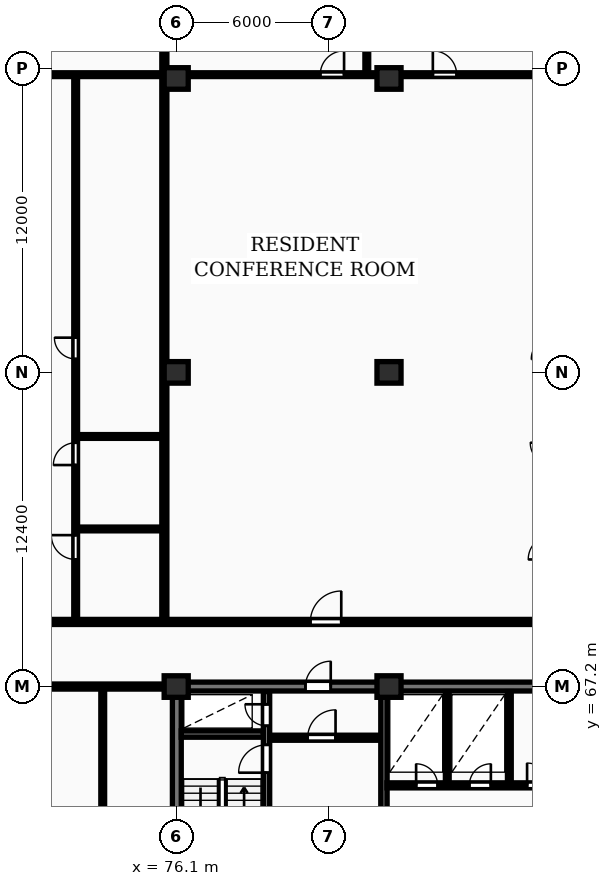
"""IFC4 building model, lengths in metres.
Left out: names, types, materials, properties, quantities, classifications, styles, units other than length and angle.
Written with IfcOpenShell. Run it as: python <this file> out.ifc"""

import sys

from ifc_helpers import new_model, si_unit, direction, frame, frame_2d, origin, origin_2d, place, context, subcontext, project, spatial, rectangle, extrude, element, fill, save


model = new_model("IFC4")
c1 = context("Model", 3, precision=1e-05, world=origin(), true_north=direction((0.0, 1.0)))
c2 = subcontext(c1, "Body", "Model", "MODEL_VIEW")
j1 = project(units=[si_unit("LENGTHUNIT", "METRE"), si_unit("PLANEANGLEUNIT", "RADIAN")], contexts=[c1])
p1 = place(None, origin())
s1 = spatial("IfcSite", under=j1, at=p1, CompositionType="ELEMENT")
p2 = place(p1, origin())
s2 = spatial("IfcBuilding", under=s1, at=p2, CompositionType="ELEMENT")
p3 = place(p2, frame((0.0, 0.0, 100.3)))
s3 = spatial("IfcBuildingStorey", under=s2, at=p3, CompositionType="ELEMENT", Elevation=100.3)
for number, where, z_axis, x_axis in (
    (1, (76.1, 67.2, 0.0), (0.0, 0.0, 1.0), (1.0, 0.0, 0.0)),
    (2, (76.1, 79.6, 0.0), (0.0, 0.0, 1.0), (1.0, 0.0, 0.0)),
    (3, (76.1, 91.2, 0.0), (0.0, 0.0, 1.0), (1.0, 0.0, 0.0)),
    (4, (84.5, 67.2, 0.0), (0.0, 0.0, 1.0), (1.0, 0.0, 0.0)),
    (5, (84.5, 79.6, 0.0), (0.0, 0.0, 1.0), (1.0, 0.0, 0.0)),
    (6, (84.5, 91.2, 0.0), (0.0, 0.0, 1.0), (1.0, 0.0, 0.0)),
):
    element("IfcColumn", number, at=place(p3, frame(where, z_axis=z_axis, x_axis=x_axis)), inside=s3, PredefinedType="COLUMN", context=c2, shape_type="SweptSolid", body=[
        extrude(rectangle(XDim=0.95, YDim=0.85, at=origin_2d()), origin(), (0.0, 0.0, 1.0), 3.25),
    ])
p4 = place(p3, frame((76.125, 55.375, 0.0), z_axis=(0.0, 0.0, 1.0), x_axis=(0.0, 1.0, 0.0)))
e7 = element("IfcWall", 7, at=p4, inside=s3, PredefinedType="SHEAR", context=c2, shape_type="SweptSolid", body=[
    extrude(rectangle(XDim=11.65, YDim=0.35, at=frame_2d((5.825, 0.0))), origin(), (0.0, 0.0, 1.0), 3.25),
])
p5 = place(p3, frame((75.95, 67.2, 0.0), z_axis=(0.0, 0.0, 1.0), x_axis=(1.0, 0.0, 0.0)))
e8 = element("IfcWall", 8, at=p5, inside=s3, PredefinedType="SHEAR", context=c2, shape_type="SweptSolid", body=[
    extrude(rectangle(XDim=36.3, YDim=0.35, at=frame_2d((18.15, 0.0))), origin(), (0.0, 0.0, 1.0), 3.25),
])
p6 = place(p5, frame((5.25, 0.0, 0.0)))
e9 = element("IfcOpeningElement", 9, at=p6, cuts=e8, PredefinedType="OPENING", context=c2, shape_type="SweptSolid", body=[
    extrude(rectangle(XDim=1.0, YDim=2.15, at=frame_2d((0.5, 1.075))), frame((0.0, 0.185, 0.0), z_axis=(0.0, -1.0, 0.0), x_axis=(1.0, 0.0, 0.0)), (0.0, 0.0, 1.0), 0.37),
])
p7 = place(p5, frame((21.6, 0.0, 0.0)))
e10 = element("IfcOpeningElement", 10, at=p7, cuts=e8, PredefinedType="OPENING", context=c2, shape_type="SweptSolid", body=[
    extrude(rectangle(XDim=1.5, YDim=2.2, at=frame_2d((0.75, 1.1))), frame((0.0, 0.185, 0.0), z_axis=(0.0, -1.0, 0.0), x_axis=(1.0, 0.0, 0.0)), (0.0, 0.0, 1.0), 0.37),
])
p8 = place(p5, frame((30.45, 0.0, 0.0)))
e11 = element("IfcOpeningElement", 11, at=p8, cuts=e8, PredefinedType="OPENING", context=c2, shape_type="SweptSolid", body=[
    extrude(rectangle(XDim=1.0, YDim=2.15, at=frame_2d((0.5, 1.075))), frame((0.0, 0.185, 0.0), z_axis=(0.0, -1.0, 0.0), x_axis=(1.0, 0.0, 0.0)), (0.0, 0.0, 1.0), 0.37),
])
p9 = place(p3, frame((79.665, 55.4, 0.0), z_axis=(0.0, 0.0, 1.0), x_axis=(0.0, 1.0, 0.0)))
e12 = element("IfcWall", 12, at=p9, inside=s3, PredefinedType="SHEAR", context=c2, shape_type="SweptSolid", body=[
    extrude(rectangle(XDim=11.6, YDim=0.25, at=frame_2d((5.8, 0.0))), origin(), (0.0, 0.0, 1.0), 3.25),
])
p10 = place(p9, frame((0.55, 0.0, 0.0)))
e13 = element("IfcOpeningElement", 13, at=p10, cuts=e12, PredefinedType="OPENING", context=c2, shape_type="SweptSolid", body=[
    extrude(rectangle(XDim=0.85, YDim=2.05, at=frame_2d((0.425, 1.025))), frame((0.0, 0.135, 0.0), z_axis=(0.0, -1.0, 0.0), x_axis=(1.0, 0.0, 0.0)), (0.0, 0.0, 1.0), 0.27),
])
p11 = place(p9, frame((8.4, 0.0, 0.0)))
e14 = element("IfcOpeningElement", 14, at=p11, cuts=e12, PredefinedType="OPENING", context=c2, shape_type="SweptSolid", body=[
    extrude(rectangle(XDim=1.1, YDim=2.1, at=frame_2d((0.55, 1.05))), frame((0.0, 0.135, 0.0), z_axis=(0.0, -1.0, 0.0), x_axis=(1.0, 0.0, 0.0)), (0.0, 0.0, 1.0), 0.27),
])
p12 = place(p9, frame((10.25, 0.0, 0.0)))
e15 = element("IfcOpeningElement", 15, at=p12, cuts=e12, PredefinedType="OPENING", context=c2, shape_type="SweptSolid", body=[
    extrude(rectangle(XDim=0.85, YDim=2.05, at=frame_2d((0.425, 1.025))), frame((0.0, 0.135, 0.0), z_axis=(0.0, -1.0, 0.0), x_axis=(1.0, 0.0, 0.0)), (0.0, 0.0, 1.0), 0.27),
])
p13 = place(p3, frame((76.3, 65.325, 0.0), z_axis=(0.0, 0.0, 1.0), x_axis=(1.0, 0.0, 0.0)))
e16 = element("IfcWall", 16, at=p13, inside=s3, PredefinedType="SHEAR", context=c2, shape_type="SweptSolid", body=[
    extrude(rectangle(XDim=3.24, YDim=0.25, at=frame_2d((1.62, 0.0))), origin(), (0.0, 0.0, 1.0), 3.25),
])
p14 = place(p3, frame((79.79, 65.18, 0.0), z_axis=(0.0, 0.0, 1.0), x_axis=(1.0, 0.0, 0.0)))
e17 = element("IfcWall", 17, at=p14, inside=s3, PredefinedType="PARTITIONING", context=c2, shape_type="SweptSolid", body=[
    extrude(rectangle(XDim=4.39, YDim=0.2, at=frame_2d((2.195, 0.0))), origin(), (0.0, 0.0, 1.0), 2.97),
])
p15 = place(p14, frame((1.5, 0.0, 0.0)))
e18 = element("IfcOpeningElement", 18, at=p15, cuts=e17, PredefinedType="OPENING", context=c2, shape_type="SweptSolid", body=[
    extrude(rectangle(XDim=1.1, YDim=2.1, at=frame_2d((0.55, 1.05))), frame((0.0, 0.11, 0.0), z_axis=(0.0, -1.0, 0.0), x_axis=(1.0, 0.0, 0.0)), (0.0, 0.0, 1.0), 0.22),
])
p16 = place(p3, frame((84.3, 55.4, 0.0), z_axis=(0.0, 0.0, 1.0), x_axis=(0.0, 1.0, 0.0)))
e19 = element("IfcWall", 19, at=p16, inside=s3, PredefinedType="SHEAR", context=c2, shape_type="SweptSolid", body=[
    extrude(rectangle(XDim=11.6, YDim=0.25, at=frame_2d((5.8, 0.0))), origin(), (0.0, 0.0, 1.0), 3.25),
])
p17 = place(p16, frame((5.2, 0.0, 0.0)))
e20 = element("IfcOpeningElement", 20, at=p17, cuts=e19, PredefinedType="OPENING", context=c2, shape_type="SweptSolid", body=[
    extrude(rectangle(XDim=1.1, YDim=2.1, at=frame_2d((0.55, 1.05))), frame((0.0, 0.135, 0.0), z_axis=(0.0, -1.0, 0.0), x_axis=(1.0, 0.0, 0.0)), (0.0, 0.0, 1.0), 0.27),
])
for number, where, z_axis, x_axis in (
    (21, (86.8, 63.4, 0.0), (0.0, 0.0, 1.0), (0.0, 1.0, 0.0)),
    (22, (89.25, 63.4, 0.0), (0.0, 0.0, 1.0), (0.0, 1.0, 0.0)),
):
    element("IfcWall", number, at=place(p3, frame(where, z_axis=z_axis, x_axis=x_axis)), inside=s3, PredefinedType="PARTITIONING", context=c2, shape_type="SweptSolid", body=[
        extrude(rectangle(XDim=3.6, YDim=0.15, at=frame_2d((1.8, 0.0))), origin(), (0.0, 0.0, 1.0), 2.97),
    ])
p18 = place(p3, frame((84.42, 63.3, 0.0), z_axis=(0.0, 0.0, 1.0), x_axis=(1.0, 0.0, 0.0)))
e23 = element("IfcWall", 23, at=p18, inside=s3, PredefinedType="PARTITIONING", context=c2, shape_type="SweptSolid", body=[
    extrude(rectangle(XDim=19.83, YDim=0.2, at=frame_2d((9.915, 0.0))), origin(), (0.0, 0.0, 1.0), 2.97),
])
p19 = place(p18, frame((1.15, 0.0, 0.0)))
e24 = element("IfcOpeningElement", 24, at=p19, cuts=e23, PredefinedType="OPENING", context=c2, shape_type="SweptSolid", body=[
    extrude(rectangle(XDim=0.85, YDim=2.05, at=frame_2d((0.425, 1.025))), frame((0.0, 0.11, 0.0), z_axis=(0.0, -1.0, 0.0), x_axis=(1.0, 0.0, 0.0)), (0.0, 0.0, 1.0), 0.22),
])
p20 = place(p18, frame((3.25, 0.0, 0.0)))
e25 = element("IfcOpeningElement", 25, at=p20, cuts=e23, PredefinedType="OPENING", context=c2, shape_type="SweptSolid", body=[
    extrude(rectangle(XDim=0.85, YDim=2.05, at=frame_2d((0.425, 1.025))), frame((0.0, 0.11, 0.0), z_axis=(0.0, -1.0, 0.0), x_axis=(1.0, 0.0, 0.0)), (0.0, 0.0, 1.0), 0.22),
])
p21 = place(p18, frame((13.08, 0.0, 0.0)))
e26 = element("IfcOpeningElement", 26, at=p21, cuts=e23, PredefinedType="OPENING", context=c2, shape_type="SweptSolid", body=[
    extrude(rectangle(XDim=1.5, YDim=2.2, at=frame_2d((0.75, 1.1))), frame((0.0, 0.11, 0.0), z_axis=(0.0, -1.0, 0.0), x_axis=(1.0, 0.0, 0.0)), (0.0, 0.0, 1.0), 0.22),
])
p22 = place(p18, frame((5.53, 0.0, 0.0)))
e27 = element("IfcOpeningElement", 27, at=p22, cuts=e23, PredefinedType="OPENING", context=c2, shape_type="SweptSolid", body=[
    extrude(rectangle(XDim=0.88, YDim=2.06, at=frame_2d((0.44, 1.03))), frame((0.0, 0.11, 0.0), z_axis=(0.0, -1.0, 0.0), x_axis=(1.0, 0.0, 0.0)), (0.0, 0.0, 1.0), 0.22),
])
p23 = place(p18, frame((7.68, 0.0, 0.0)))
e28 = element("IfcOpeningElement", 28, at=p23, cuts=e23, PredefinedType="OPENING", context=c2, shape_type="SweptSolid", body=[
    extrude(rectangle(XDim=0.88, YDim=2.06, at=frame_2d((0.44, 1.03))), frame((0.0, 0.11, 0.0), z_axis=(0.0, -1.0, 0.0), x_axis=(1.0, 0.0, 0.0)), (0.0, 0.0, 1.0), 0.22),
])
p24 = place(p18, frame((10.43, 0.0, 0.0)))
e29 = element("IfcOpeningElement", 29, at=p24, cuts=e23, PredefinedType="OPENING", context=c2, shape_type="SweptSolid", body=[
    extrude(rectangle(XDim=0.85, YDim=2.05, at=frame_2d((0.425, 1.025))), frame((0.0, 0.11, 0.0), z_axis=(0.0, -1.0, 0.0), x_axis=(1.0, 0.0, 0.0)), (0.0, 0.0, 1.0), 0.22),
])
p25 = place(p18, frame((16.23, 0.0, 0.0)))
e30 = element("IfcOpeningElement", 30, at=p25, cuts=e23, PredefinedType="OPENING", context=c2, shape_type="SweptSolid", body=[
    extrude(rectangle(XDim=0.96, YDim=2.1, at=frame_2d((0.48, 1.05))), frame((0.0, 0.11, 0.0), z_axis=(0.0, -1.0, 0.0), x_axis=(1.0, 0.0, 0.0)), (0.0, 0.0, 1.0), 0.22),
])
p26 = place(p18, frame((18.68, 0.0, 0.0)))
e31 = element("IfcOpeningElement", 31, at=p26, cuts=e23, PredefinedType="OPENING", context=c2, shape_type="SweptSolid", body=[
    extrude(rectangle(XDim=0.84, YDim=2.04, at=frame_2d((0.42, 1.02))), frame((0.0, 0.11, 0.0), z_axis=(0.0, -1.0, 0.0), x_axis=(1.0, 0.0, 0.0)), (0.0, 0.0, 1.0), 0.22),
])
p27 = place(p3, frame((73.2, 56.07, 0.0), z_axis=(0.0, 0.0, 1.0), x_axis=(0.0, 1.0, 0.0)))
e32 = element("IfcWall", 32, at=p27, inside=s3, PredefinedType="PARTITIONING", context=c2, shape_type="SweptSolid", body=[
    extrude(rectangle(XDim=11.08, YDim=0.15, at=frame_2d((5.54, 0.0))), origin(), (0.0, 0.0, 1.0), 2.97),
])
p28 = place(p27, frame((5.08, 0.0, 0.0)))
e33 = element("IfcOpeningElement", 33, at=p28, cuts=e32, PredefinedType="OPENING", context=c2, shape_type="SweptSolid", body=[
    extrude(rectangle(XDim=0.92, YDim=2.08, at=frame_2d((0.46, 1.04))), frame((0.0, 0.085, 0.0), z_axis=(0.0, -1.0, 0.0), x_axis=(1.0, 0.0, 0.0)), (0.0, 0.0, 1.0), 0.17),
])
p29 = place(p3, frame((57.6, 67.2, 0.0), z_axis=(0.0, 0.0, 1.0), x_axis=(1.0, 0.0, 0.0)))
e34 = element("IfcWall", 34, at=p29, inside=s3, PredefinedType="PARTITIONING", context=c2, shape_type="SweptSolid", body=[
    extrude(rectangle(XDim=18.35, YDim=0.2, at=frame_2d((9.175, 0.0))), origin(), (0.0, 0.0, 1.0), 2.433),
])
p30 = place(p29, frame((12.075, 0.0, 0.0)))
e35 = element("IfcOpeningElement", 35, at=p30, cuts=e34, PredefinedType="OPENING", context=c2, shape_type="SweptSolid", body=[
    extrude(rectangle(XDim=0.95, YDim=2.15, at=frame_2d((0.475, 1.075))), frame((0.0, 0.11, 0.0), z_axis=(0.0, -1.0, 0.0), x_axis=(1.0, 0.0, 0.0)), (0.0, 0.0, 1.0), 0.22),
])
p31 = place(p3, frame((75.632, 69.83, 0.0), z_axis=(0.0, 0.0, 1.0), x_axis=(0.0, 1.0, 0.0)))
e36 = element("IfcWall", 36, at=p31, inside=s3, PredefinedType="PARTITIONING", context=c2, shape_type="SweptSolid", body=[
    extrude(rectangle(XDim=26.07, YDim=0.2, at=frame_2d((13.035, 0.0))), origin(), (0.0, 0.0, 1.0), 2.97),
])
for number, where, z_axis, x_axis in (
    (37, (72.192, 73.42, 0.0), (0.0, 0.0, 1.0), (1.0, 0.0, 0.0)),
    (38, (72.192, 77.07, 0.0), (0.0, 0.0, 1.0), (1.0, 0.0, 0.0)),
):
    element("IfcWall", number, at=place(p3, frame(where, z_axis=z_axis, x_axis=x_axis)), inside=s3, PredefinedType="PARTITIONING", context=c2, shape_type="SweptSolid", body=[
        extrude(rectangle(XDim=3.36, YDim=0.15, at=frame_2d((1.68, 0.0))), origin(), (0.0, 0.0, 1.0), 2.97),
    ])
p32 = place(p3, frame((72.132, 69.81, 0.0), z_axis=(0.0, 0.0, 1.0), x_axis=(0.0, 1.0, 0.0)))
e39 = element("IfcWall", 39, at=p32, inside=s3, PredefinedType="PARTITIONING", context=c2, shape_type="SweptSolid", body=[
    extrude(rectangle(XDim=21.48, YDim=0.15, at=frame_2d((10.74, 0.0))), origin(), (0.0, 0.0, 1.0), 2.97),
])
p33 = place(p32, frame((2.406, 0.0, 0.0)))
e40 = element("IfcOpeningElement", 40, at=p33, cuts=e39, PredefinedType="OPENING", context=c2, shape_type="SweptSolid", body=[
    extrude(rectangle(XDim=0.96, YDim=2.1, at=frame_2d((0.48, 1.05))), frame((0.0, 0.085, 0.0), z_axis=(0.0, -1.0, 0.0), x_axis=(1.0, 0.0, 0.0)), (0.0, 0.0, 1.0), 0.17),
])
p34 = place(p32, frame((6.133, 0.0, 0.0)))
e41 = element("IfcOpeningElement", 41, at=p34, cuts=e39, PredefinedType="OPENING", context=c2, shape_type="SweptSolid", body=[
    extrude(rectangle(XDim=0.88, YDim=2.06, at=frame_2d((0.44, 1.03))), frame((0.0, 0.085, 0.0), z_axis=(0.0, -1.0, 0.0), x_axis=(1.0, 0.0, 0.0)), (0.0, 0.0, 1.0), 0.17),
])
p35 = place(p32, frame((10.32, 0.0, 0.0)))
e42 = element("IfcOpeningElement", 42, at=p35, cuts=e39, PredefinedType="OPENING", context=c2, shape_type="SweptSolid", body=[
    extrude(rectangle(XDim=0.84, YDim=2.04, at=frame_2d((0.42, 1.02))), frame((0.0, 0.085, 0.0), z_axis=(0.0, -1.0, 0.0), x_axis=(1.0, 0.0, 0.0)), (0.0, 0.0, 1.0), 0.17),
])
p36 = place(p3, frame((57.68, 91.35, 0.0), z_axis=(0.0, 0.0, 1.0), x_axis=(1.0, 0.0, 0.0)))
e43 = element("IfcWall", 43, at=p36, inside=s3, PredefinedType="PARTITIONING", context=c2, shape_type="SweptSolid", body=[
    extrude(rectangle(XDim=17.872, YDim=0.15, at=frame_2d((8.936, 0.0))), origin(), (0.0, 0.0, 1.0), 2.663),
])
p37 = place(p36, frame((6.326, 0.0, 0.0)))
e44 = element("IfcOpeningElement", 44, at=p37, cuts=e43, PredefinedType="OPENING", context=c2, shape_type="SweptSolid", body=[
    extrude(rectangle(XDim=0.94, YDim=2.1, at=frame_2d((0.47, 1.05))), frame((0.0, 0.085, 0.0), z_axis=(0.0, -1.0, 0.0), x_axis=(1.0, 0.0, 0.0)), (0.0, 0.0, 1.0), 0.17),
])
p38 = place(p36, frame((12.053, 0.0, 0.0)))
e45 = element("IfcOpeningElement", 45, at=p38, cuts=e43, PredefinedType="OPENING", context=c2, shape_type="SweptSolid", body=[
    extrude(rectangle(XDim=0.94, YDim=2.1, at=frame_2d((0.47, 1.05))), frame((0.0, 0.085, 0.0), z_axis=(0.0, -1.0, 0.0), x_axis=(1.0, 0.0, 0.0)), (0.0, 0.0, 1.0), 0.17),
])
p39 = place(p3, frame((83.624, 91.43, 0.0), z_axis=(0.0, 0.0, 1.0), x_axis=(0.0, 1.0, 0.0)))
e46 = element("IfcWall", 46, at=p39, inside=s3, PredefinedType="PARTITIONING", context=c2, shape_type="SweptSolid", body=[
    extrude(rectangle(XDim=4.47, YDim=0.15, at=frame_2d((2.235, 0.0))), origin(), (0.0, 0.0, 1.0), 2.97),
])
p40 = place(p3, frame((75.712, 91.35, 0.0), z_axis=(0.0, 0.0, 1.0), x_axis=(1.0, 0.0, 0.0)))
e47 = element("IfcWall", 47, at=p40, inside=s3, PredefinedType="PARTITIONING", context=c2, shape_type="SweptSolid", body=[
    extrude(rectangle(XDim=18.433, YDim=0.15, at=frame_2d((9.216, 0.0))), origin(), (0.0, 0.0, 1.0), 2.663),
])
p41 = place(p40, frame((6.074, 0.0, 0.0)))
e48 = element("IfcOpeningElement", 48, at=p41, cuts=e47, PredefinedType="OPENING", context=c2, shape_type="SweptSolid", body=[
    extrude(rectangle(XDim=0.94, YDim=2.1, at=frame_2d((0.47, 1.05))), frame((0.0, 0.085, 0.0), z_axis=(0.0, -1.0, 0.0), x_axis=(1.0, 0.0, 0.0)), (0.0, 0.0, 1.0), 0.17),
])
p42 = place(p40, frame((10.518, 0.0, 0.0)))
e49 = element("IfcOpeningElement", 49, at=p42, cuts=e47, PredefinedType="OPENING", context=c2, shape_type="SweptSolid", body=[
    extrude(rectangle(XDim=0.94, YDim=2.1, at=frame_2d((0.47, 1.05))), frame((0.0, 0.085, 0.0), z_axis=(0.0, -1.0, 0.0), x_axis=(1.0, 0.0, 0.0)), (0.0, 0.0, 1.0), 0.17),
])
p43 = place(p3, frame((57.6, 69.75, 0.0), z_axis=(0.0, 0.0, 1.0), x_axis=(1.0, 0.0, 0.0)))
e50 = element("IfcWall", 50, at=p43, inside=s3, PredefinedType="PARTITIONING", context=c2, shape_type="SweptSolid", body=[
    extrude(rectangle(XDim=73.0, YDim=0.2, at=frame_2d((36.5, 0.0))), origin(), (0.0, 0.0, 1.0), 2.97),
])
p44 = place(p43, frame((7.326, 0.0, 0.0)))
e51 = element("IfcOpeningElement", 51, at=p44, cuts=e50, PredefinedType="OPENING", context=c2, shape_type="SweptSolid", body=[
    extrude(rectangle(XDim=1.22, YDim=2.18, at=frame_2d((0.61, 1.09))), frame((0.0, 0.11, 0.0), z_axis=(0.0, -1.0, 0.0), x_axis=(1.0, 0.0, 0.0)), (0.0, 0.0, 1.0), 0.22),
])
p45 = place(p43, frame((23.795, 0.0, 0.0)))
e52 = element("IfcOpeningElement", 52, at=p45, cuts=e50, PredefinedType="OPENING", context=c2, shape_type="SweptSolid", body=[
    extrude(rectangle(XDim=1.22, YDim=2.18, at=frame_2d((0.61, 1.09))), frame((0.0, 0.11, 0.0), z_axis=(0.0, -1.0, 0.0), x_axis=(1.0, 0.0, 0.0)), (0.0, 0.0, 1.0), 0.22),
])
p46 = place(p43, frame((38.67, 0.0, 0.0)))
e53 = element("IfcOpeningElement", 53, at=p46, cuts=e50, PredefinedType="OPENING", context=c2, shape_type="SweptSolid", body=[
    extrude(rectangle(XDim=0.95, YDim=2.15, at=frame_2d((0.475, 1.075))), frame((0.0, 0.11, 0.0), z_axis=(0.0, -1.0, 0.0), x_axis=(1.0, 0.0, 0.0)), (0.0, 0.0, 1.0), 0.22),
])
p47 = place(p43, frame((48.279, 0.0, 0.0)))
e54 = element("IfcOpeningElement", 54, at=p47, cuts=e50, PredefinedType="OPENING", context=c2, shape_type="SweptSolid", body=[
    extrude(rectangle(XDim=0.95, YDim=2.15, at=frame_2d((0.475, 1.075))), frame((0.0, 0.11, 0.0), z_axis=(0.0, -1.0, 0.0), x_axis=(1.0, 0.0, 0.0)), (0.0, 0.0, 1.0), 0.22),
])
p48 = place(p43, frame((58.449, 0.0, 0.0)))
e55 = element("IfcOpeningElement", 55, at=p48, cuts=e50, PredefinedType="OPENING", context=c2, shape_type="SweptSolid", body=[
    extrude(rectangle(XDim=0.95, YDim=2.15, at=frame_2d((0.475, 1.075))), frame((0.0, 0.11, 0.0), z_axis=(0.0, -1.0, 0.0), x_axis=(1.0, 0.0, 0.0)), (0.0, 0.0, 1.0), 0.22),
])
p49 = place(p6, origin())
e56 = element("IfcDoor", 56, at=p49, inside=s3, OperationType="SINGLE_SWING_RIGHT", PredefinedType="DOOR", context=c2, shape_type="SweptSolid", body=[
    extrude(rectangle(XDim=1.0, YDim=2.15, at=frame_2d((0.5, 1.075))), frame((0.0, 0.025, 0.0), z_axis=(0.0, -1.0, 0.0), x_axis=(1.0, 0.0, 0.0)), (0.0, 0.0, 1.0), 0.05),
])
fill(e9, e56)
p50 = place(p11, origin())
e57 = element("IfcDoor", 57, at=p50, inside=s3, OperationType="SINGLE_SWING_LEFT", PredefinedType="DOOR", context=c2, shape_type="SweptSolid", body=[
    extrude(rectangle(XDim=1.1, YDim=2.1, at=frame_2d((0.55, 1.05))), frame((0.0, 0.025, 0.0), z_axis=(0.0, -1.0, 0.0), x_axis=(1.0, 0.0, 0.0)), (0.0, 0.0, 1.0), 0.05),
])
fill(e14, e57)
p51 = place(p12, origin())
e58 = element("IfcDoor", 58, at=p51, inside=s3, OperationType="SINGLE_SWING_RIGHT", PredefinedType="DOOR", context=c2, shape_type="SweptSolid", body=[
    extrude(rectangle(XDim=0.85, YDim=2.05, at=frame_2d((0.425, 1.025))), frame((0.0, 0.025, 0.0), z_axis=(0.0, -1.0, 0.0), x_axis=(1.0, 0.0, 0.0)), (0.0, 0.0, 1.0), 0.05),
])
fill(e15, e58)
p52 = place(p15, origin())
e59 = element("IfcDoor", 59, at=p52, inside=s3, OperationType="SINGLE_SWING_RIGHT", PredefinedType="DOOR", context=c2, shape_type="SweptSolid", body=[
    extrude(rectangle(XDim=1.1, YDim=2.1, at=frame_2d((0.55, 1.05))), frame((0.0, 0.025, 0.0), z_axis=(0.0, -1.0, 0.0), x_axis=(1.0, 0.0, 0.0)), (0.0, 0.0, 1.0), 0.05),
])
fill(e18, e59)
p53 = place(p19, origin())
e60 = element("IfcDoor", 60, at=p53, inside=s3, OperationType="SINGLE_SWING_LEFT", PredefinedType="DOOR", context=c2, shape_type="SweptSolid", body=[
    extrude(rectangle(XDim=0.85, YDim=2.05, at=frame_2d((0.425, 1.025))), frame((0.0, 0.025, 0.0), z_axis=(0.0, -1.0, 0.0), x_axis=(1.0, 0.0, 0.0)), (0.0, 0.0, 1.0), 0.05),
])
fill(e24, e60)
p54 = place(p20, origin())
e61 = element("IfcDoor", 61, at=p54, inside=s3, OperationType="SINGLE_SWING_RIGHT", PredefinedType="DOOR", context=c2, shape_type="SweptSolid", body=[
    extrude(rectangle(XDim=0.85, YDim=2.05, at=frame_2d((0.425, 1.025))), frame((0.0, 0.025, 0.0), z_axis=(0.0, -1.0, 0.0), x_axis=(1.0, 0.0, 0.0)), (0.0, 0.0, 1.0), 0.05),
])
fill(e25, e61)
p55 = place(p22, origin())
e62 = element("IfcDoor", 62, at=p55, inside=s3, OperationType="SINGLE_SWING_LEFT", PredefinedType="DOOR", context=c2, shape_type="SweptSolid", body=[
    extrude(rectangle(XDim=0.88, YDim=2.06, at=frame_2d((0.44, 1.03))), frame((0.0, 0.025, 0.0), z_axis=(0.0, -1.0, 0.0), x_axis=(1.0, 0.0, 0.0)), (0.0, 0.0, 1.0), 0.05),
])
fill(e27, e62)
p56 = place(p33, origin())
e63 = element("IfcDoor", 63, at=p56, inside=s3, OperationType="SINGLE_SWING_RIGHT", PredefinedType="DOOR", context=c2, shape_type="SweptSolid", body=[
    extrude(rectangle(XDim=0.96, YDim=2.1, at=frame_2d((0.48, 1.05))), frame((0.0, 0.025, 0.0), z_axis=(0.0, -1.0, 0.0), x_axis=(1.0, 0.0, 0.0)), (0.0, 0.0, 1.0), 0.05),
])
fill(e40, e63)
p57 = place(p34, origin())
e64 = element("IfcDoor", 64, at=p57, inside=s3, OperationType="SINGLE_SWING_LEFT", PredefinedType="DOOR", context=c2, shape_type="SweptSolid", body=[
    extrude(rectangle(XDim=0.88, YDim=2.06, at=frame_2d((0.44, 1.03))), frame((0.0, 0.025, 0.0), z_axis=(0.0, -1.0, 0.0), x_axis=(1.0, 0.0, 0.0)), (0.0, 0.0, 1.0), 0.05),
])
fill(e41, e64)
p58 = place(p35, origin())
e65 = element("IfcDoor", 65, at=p58, inside=s3, OperationType="SINGLE_SWING_RIGHT", PredefinedType="DOOR", context=c2, shape_type="SweptSolid", body=[
    extrude(rectangle(XDim=0.84, YDim=2.04, at=frame_2d((0.42, 1.02))), frame((0.0, 0.025, 0.0), z_axis=(0.0, -1.0, 0.0), x_axis=(1.0, 0.0, 0.0)), (0.0, 0.0, 1.0), 0.05),
])
fill(e42, e65)
p59 = place(p41, origin())
e66 = element("IfcDoor", 66, at=p59, inside=s3, OperationType="SINGLE_SWING_RIGHT", PredefinedType="DOOR", context=c2, shape_type="SweptSolid", body=[
    extrude(rectangle(XDim=0.94, YDim=2.1, at=frame_2d((0.47, 1.05))), frame((0.0, 0.025, 0.0), z_axis=(0.0, -1.0, 0.0), x_axis=(1.0, 0.0, 0.0)), (0.0, 0.0, 1.0), 0.05),
])
fill(e48, e66)
p60 = place(p42, origin())
e67 = element("IfcDoor", 67, at=p60, inside=s3, OperationType="SINGLE_SWING_LEFT", PredefinedType="DOOR", context=c2, shape_type="SweptSolid", body=[
    extrude(rectangle(XDim=0.94, YDim=2.1, at=frame_2d((0.47, 1.05))), frame((0.0, 0.025, 0.0), z_axis=(0.0, -1.0, 0.0), x_axis=(1.0, 0.0, 0.0)), (0.0, 0.0, 1.0), 0.05),
])
fill(e49, e67)
p61 = place(p45, origin())
e68 = element("IfcDoor", 68, at=p61, inside=s3, OperationType="SINGLE_SWING_RIGHT", PredefinedType="DOOR", context=c2, shape_type="SweptSolid", body=[
    extrude(rectangle(XDim=1.22, YDim=2.18, at=frame_2d((0.61, 1.09))), frame((0.0, 0.025, 0.0), z_axis=(0.0, -1.0, 0.0), x_axis=(1.0, 0.0, 0.0)), (0.0, 0.0, 1.0), 0.05),
])
fill(e52, e68)
save(model, sys.argv[1])
